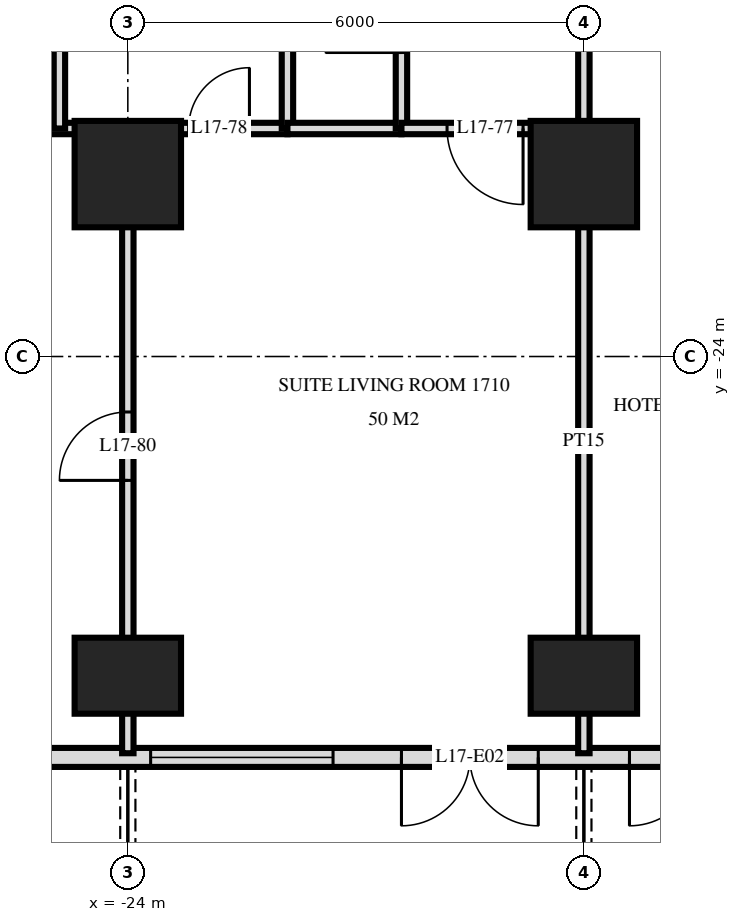
"""IFC4 building model, lengths in metres.
Left out: names, types, materials, properties, quantities, classifications, styles, units other than length and angle.
Written with IfcOpenShell. Run it as: python <this file> out.ifc"""

import sys

from ifc_helpers import new_model, si_unit, direction, frame, frame_2d, origin, origin_2d, place, context, subcontext, project, spatial, rectangle, extrude, element, fill, save


model = new_model("IFC4")
c1 = context("Model", 3, precision=1e-05, world=origin(), true_north=direction((0.0, 1.0)))
c2 = subcontext(c1, "Body", "Model", "MODEL_VIEW")
j1 = project(units=[si_unit("LENGTHUNIT", "METRE"), si_unit("PLANEANGLEUNIT", "RADIAN")], contexts=[c1])
p1 = place(None, origin())
s1 = spatial("IfcSite", under=j1, at=p1, CompositionType="ELEMENT")
p2 = place(p1, origin())
s2 = spatial("IfcBuilding", under=s1, at=p2, CompositionType="ELEMENT")
p3 = place(p2, frame((0.0, 0.0, 70.8)))
s3 = spatial("IfcBuildingStorey", under=s2, at=p3, CompositionType="ELEMENT", Elevation=70.8)
p4 = place(p3, frame((-24.0, -28.2, 0.0), z_axis=(0.0, 0.0, 1.0), x_axis=(1.0, 0.0, 0.0)))
e1 = element("IfcColumn", 1, at=p4, inside=s3, PredefinedType="COLUMN", context=c2, shape_type="SweptSolid", body=[
    extrude(rectangle(XDim=1.4, YDim=1.0, at=origin_2d()), origin(), (0.0, 0.0, 1.0), 3.6),
])
p5 = place(p3, frame((-24.0, -21.6, 0.0), z_axis=(0.0, 0.0, 1.0), x_axis=(1.0, 0.0, 0.0)))
e2 = element("IfcColumn", 2, at=p5, inside=s3, PredefinedType="COLUMN", context=c2, shape_type="SweptSolid", body=[
    extrude(rectangle(XDim=1.4, YDim=1.4, at=origin_2d()), origin(), (0.0, 0.0, 1.0), 3.6),
])
p6 = place(p3, frame((-18.0, -28.2, 0.0), z_axis=(0.0, 0.0, 1.0), x_axis=(1.0, 0.0, 0.0)))
e3 = element("IfcColumn", 3, at=p6, inside=s3, PredefinedType="COLUMN", context=c2, shape_type="SweptSolid", body=[
    extrude(rectangle(XDim=1.4, YDim=1.0, at=origin_2d()), origin(), (0.0, 0.0, 1.0), 3.6),
])
p7 = place(p3, frame((-18.0, -21.6, 0.0), z_axis=(0.0, 0.0, 1.0), x_axis=(1.0, 0.0, 0.0)))
e4 = element("IfcColumn", 4, at=p7, inside=s3, PredefinedType="COLUMN", context=c2, shape_type="SweptSolid", body=[
    extrude(rectangle(XDim=1.4, YDim=1.4, at=origin_2d()), origin(), (0.0, 0.0, 1.0), 3.6),
])
p8 = place(p3, frame((-28.775, -29.275, 0.0), z_axis=(0.0, 0.0, 1.0), x_axis=(1.0, 0.0, 0.0)))
e5 = element("IfcWall", 5, at=p8, inside=s3, PredefinedType="SOLIDWALL", context=c2, shape_type="SweptSolid", body=[
    extrude(rectangle(XDim=57.551, YDim=0.25, at=frame_2d((28.775, 0.0))), origin(), (0.0, 0.0, 1.0), 3.32),
])
p9 = place(p8, frame((0.575, 0.0, 0.0)))
e6 = element("IfcOpeningElement", 6, at=p9, cuts=e5, PredefinedType="OPENING", context=c2, shape_type="SweptSolid", body=[
    extrude(rectangle(XDim=1.8, YDim=2.4, at=frame_2d((0.9, 1.2))), frame((0.0, 0.135, 0.0), z_axis=(0.0, -1.0, 0.0), x_axis=(1.0, 0.0, 0.0)), (0.0, 0.0, 1.0), 0.27),
])
p10 = place(p8, frame((5.075, 0.0, 0.3)))
e7 = element("IfcOpeningElement", 7, at=p10, cuts=e5, PredefinedType="OPENING", context=c2, shape_type="SweptSolid", body=[
    extrude(rectangle(XDim=2.4, YDim=2.1, at=frame_2d((1.2, 1.05))), frame((0.0, 0.135, 0.0), z_axis=(0.0, -1.0, 0.0), x_axis=(1.0, 0.0, 0.0)), (0.0, 0.0, 1.0), 0.27),
])
p11 = place(p8, frame((8.375, 0.0, 0.0)))
e8 = element("IfcOpeningElement", 8, at=p11, cuts=e5, PredefinedType="OPENING", context=c2, shape_type="SweptSolid", body=[
    extrude(rectangle(XDim=1.8, YDim=2.4, at=frame_2d((0.9, 1.2))), frame((0.0, 0.135, 0.0), z_axis=(0.0, -1.0, 0.0), x_axis=(1.0, 0.0, 0.0)), (0.0, 0.0, 1.0), 0.27),
])
p12 = place(p8, frame((11.375, 0.0, 0.0)))
e9 = element("IfcOpeningElement", 9, at=p12, cuts=e5, PredefinedType="OPENING", context=c2, shape_type="SweptSolid", body=[
    extrude(rectangle(XDim=1.8, YDim=2.4, at=frame_2d((0.9, 1.2))), frame((0.0, 0.135, 0.0), z_axis=(0.0, -1.0, 0.0), x_axis=(1.0, 0.0, 0.0)), (0.0, 0.0, 1.0), 0.27),
])
p13 = place(p8, frame((14.075, 0.0, 0.3)))
e10 = element("IfcOpeningElement", 10, at=p13, cuts=e5, PredefinedType="OPENING", context=c2, shape_type="SweptSolid", body=[
    extrude(rectangle(XDim=2.4, YDim=2.1, at=frame_2d((1.2, 1.05))), frame((0.0, 0.135, 0.0), z_axis=(0.0, -1.0, 0.0), x_axis=(1.0, 0.0, 0.0)), (0.0, 0.0, 1.0), 0.27),
])
p14 = place(p8, frame((17.375, 0.0, 0.0)))
e11 = element("IfcOpeningElement", 11, at=p14, cuts=e5, PredefinedType="OPENING", context=c2, shape_type="SweptSolid", body=[
    extrude(rectangle(XDim=1.8, YDim=2.4, at=frame_2d((0.9, 1.2))), frame((0.0, 0.135, 0.0), z_axis=(0.0, -1.0, 0.0), x_axis=(1.0, 0.0, 0.0)), (0.0, 0.0, 1.0), 0.27),
])
p15 = place(p8, frame((20.075, 0.0, 0.3)))
e12 = element("IfcOpeningElement", 12, at=p15, cuts=e5, PredefinedType="OPENING", context=c2, shape_type="SweptSolid", body=[
    extrude(rectangle(XDim=2.4, YDim=2.1, at=frame_2d((1.2, 1.05))), frame((0.0, 0.135, 0.0), z_axis=(0.0, -1.0, 0.0), x_axis=(1.0, 0.0, 0.0)), (0.0, 0.0, 1.0), 0.27),
])
p16 = place(p8, frame((23.075, 0.0, 0.3)))
e13 = element("IfcOpeningElement", 13, at=p16, cuts=e5, PredefinedType="OPENING", context=c2, shape_type="SweptSolid", body=[
    extrude(rectangle(XDim=2.4, YDim=2.1, at=frame_2d((1.2, 1.05))), frame((0.0, 0.135, 0.0), z_axis=(0.0, -1.0, 0.0), x_axis=(1.0, 0.0, 0.0)), (0.0, 0.0, 1.0), 0.27),
])
p17 = place(p8, frame((26.375, 0.0, 0.0)))
e14 = element("IfcOpeningElement", 14, at=p17, cuts=e5, PredefinedType="OPENING", context=c2, shape_type="SweptSolid", body=[
    extrude(rectangle(XDim=1.8, YDim=2.4, at=frame_2d((0.9, 1.2))), frame((0.0, 0.135, 0.0), z_axis=(0.0, -1.0, 0.0), x_axis=(1.0, 0.0, 0.0)), (0.0, 0.0, 1.0), 0.27),
])
p18 = place(p8, frame((29.375, 0.0, 0.0)))
e15 = element("IfcOpeningElement", 15, at=p18, cuts=e5, PredefinedType="OPENING", context=c2, shape_type="SweptSolid", body=[
    extrude(rectangle(XDim=1.8, YDim=2.4, at=frame_2d((0.9, 1.2))), frame((0.0, 0.135, 0.0), z_axis=(0.0, -1.0, 0.0), x_axis=(1.0, 0.0, 0.0)), (0.0, 0.0, 1.0), 0.27),
])
p19 = place(p8, frame((32.075, 0.0, 0.3)))
e16 = element("IfcOpeningElement", 16, at=p19, cuts=e5, PredefinedType="OPENING", context=c2, shape_type="SweptSolid", body=[
    extrude(rectangle(XDim=2.4, YDim=2.1, at=frame_2d((1.2, 1.05))), frame((0.0, 0.135, 0.0), z_axis=(0.0, -1.0, 0.0), x_axis=(1.0, 0.0, 0.0)), (0.0, 0.0, 1.0), 0.27),
])
p20 = place(p8, frame((35.375, 0.0, 0.0)))
e17 = element("IfcOpeningElement", 17, at=p20, cuts=e5, PredefinedType="OPENING", context=c2, shape_type="SweptSolid", body=[
    extrude(rectangle(XDim=1.8, YDim=2.4, at=frame_2d((0.9, 1.2))), frame((0.0, 0.135, 0.0), z_axis=(0.0, -1.0, 0.0), x_axis=(1.0, 0.0, 0.0)), (0.0, 0.0, 1.0), 0.27),
])
p21 = place(p8, frame((38.075, 0.0, 0.3)))
e18 = element("IfcOpeningElement", 18, at=p21, cuts=e5, PredefinedType="OPENING", context=c2, shape_type="SweptSolid", body=[
    extrude(rectangle(XDim=2.4, YDim=2.1, at=frame_2d((1.2, 1.05))), frame((0.0, 0.135, 0.0), z_axis=(0.0, -1.0, 0.0), x_axis=(1.0, 0.0, 0.0)), (0.0, 0.0, 1.0), 0.27),
])
p22 = place(p8, frame((41.075, 0.0, 0.3)))
e19 = element("IfcOpeningElement", 19, at=p22, cuts=e5, PredefinedType="OPENING", context=c2, shape_type="SweptSolid", body=[
    extrude(rectangle(XDim=2.4, YDim=2.1, at=frame_2d((1.2, 1.05))), frame((0.0, 0.135, 0.0), z_axis=(0.0, -1.0, 0.0), x_axis=(1.0, 0.0, 0.0)), (0.0, 0.0, 1.0), 0.27),
])
p23 = place(p8, frame((44.375, 0.0, 0.0)))
e20 = element("IfcOpeningElement", 20, at=p23, cuts=e5, PredefinedType="OPENING", context=c2, shape_type="SweptSolid", body=[
    extrude(rectangle(XDim=1.8, YDim=2.4, at=frame_2d((0.9, 1.2))), frame((0.0, 0.135, 0.0), z_axis=(0.0, -1.0, 0.0), x_axis=(1.0, 0.0, 0.0)), (0.0, 0.0, 1.0), 0.27),
])
p24 = place(p8, frame((47.075, 0.0, 0.3)))
e21 = element("IfcOpeningElement", 21, at=p24, cuts=e5, PredefinedType="OPENING", context=c2, shape_type="SweptSolid", body=[
    extrude(rectangle(XDim=2.4, YDim=2.1, at=frame_2d((1.2, 1.05))), frame((0.0, 0.135, 0.0), z_axis=(0.0, -1.0, 0.0), x_axis=(1.0, 0.0, 0.0)), (0.0, 0.0, 1.0), 0.27),
])
p25 = place(p8, frame((50.375, 0.0, 0.0)))
e22 = element("IfcOpeningElement", 22, at=p25, cuts=e5, PredefinedType="OPENING", context=c2, shape_type="SweptSolid", body=[
    extrude(rectangle(XDim=1.8, YDim=2.4, at=frame_2d((0.9, 1.2))), frame((0.0, 0.135, 0.0), z_axis=(0.0, -1.0, 0.0), x_axis=(1.0, 0.0, 0.0)), (0.0, 0.0, 1.0), 0.27),
])
p26 = place(p8, frame((53.375, 0.0, 0.0)))
e23 = element("IfcOpeningElement", 23, at=p26, cuts=e5, PredefinedType="OPENING", context=c2, shape_type="SweptSolid", body=[
    extrude(rectangle(XDim=1.8, YDim=2.4, at=frame_2d((0.9, 1.2))), frame((0.0, 0.135, 0.0), z_axis=(0.0, -1.0, 0.0), x_axis=(1.0, 0.0, 0.0)), (0.0, 0.0, 1.0), 0.27),
])
p27 = place(p3, frame((-18.0, -21.0, 0.0), z_axis=(0.0, 0.0, 1.0), x_axis=(0.0, 1.0, 0.0)))
e24 = element("IfcWall", 24, at=p27, inside=s3, PredefinedType="PARTITIONING", context=c2, shape_type="SweptSolid", body=[
    extrude(rectangle(XDim=3.0, YDim=0.15, at=frame_2d((1.5, 0.0))), origin(), (0.0, 0.0, 1.0), 3.32),
])
p28 = place(p3, frame((-18.0, -29.22, 0.0), z_axis=(0.0, 0.0, 1.0), x_axis=(0.0, 1.0, 0.0)))
e25 = element("IfcWall", 25, at=p28, inside=s3, PredefinedType="PARTITIONING", context=c2, shape_type="SweptSolid", body=[
    extrude(rectangle(XDim=8.22, YDim=0.15, at=frame_2d((4.11, 0.0))), origin(), (0.0, 0.0, 1.0), 3.32),
])
p29 = place(p3, frame((-20.4, -21.0, 0.0), z_axis=(0.0, 0.0, 1.0), x_axis=(0.0, 1.0, 0.0)))
e26 = element("IfcWall", 26, at=p29, inside=s3, PredefinedType="PARTITIONING", context=c2, shape_type="SweptSolid", body=[
    extrude(rectangle(XDim=3.0, YDim=0.15, at=frame_2d((1.5, 0.0))), origin(), (0.0, 0.0, 1.0), 3.32),
])
p30 = place(p29, frame((1.0, 0.0, 0.0)))
e27 = element("IfcOpeningElement", 27, at=p30, cuts=e26, PredefinedType="OPENING", context=c2, shape_type="SweptSolid", body=[
    extrude(rectangle(XDim=1.0, YDim=2.1, at=frame_2d((0.5, 1.05))), frame((0.0, 0.085, 0.0), z_axis=(0.0, -1.0, 0.0), x_axis=(1.0, 0.0, 0.0)), (0.0, 0.0, 1.0), 0.17),
])
p31 = place(p3, frame((-21.9, -21.0, 0.0), z_axis=(0.0, 0.0, 1.0), x_axis=(0.0, 1.0, 0.0)))
e28 = element("IfcWall", 28, at=p31, inside=s3, PredefinedType="PLUMBINGWALL", context=c2, shape_type="SweptSolid", body=[
    extrude(rectangle(XDim=3.0, YDim=0.15, at=frame_2d((1.5, 0.0))), origin(), (0.0, 0.0, 1.0), 3.32),
])
p32 = place(p3, frame((-24.0, -29.22, 0.0), z_axis=(0.0, 0.0, 1.0), x_axis=(0.0, 1.0, 0.0)))
e29 = element("IfcWall", 29, at=p32, inside=s3, PredefinedType="PARTITIONING", context=c2, shape_type="SweptSolid", body=[
    extrude(rectangle(XDim=8.22, YDim=0.15, at=frame_2d((4.11, 0.0))), origin(), (0.0, 0.0, 1.0), 3.32),
])
p33 = place(p32, frame((3.59, 0.0, 0.0)))
e30 = element("IfcOpeningElement", 30, at=p33, cuts=e29, PredefinedType="OPENING", context=c2, shape_type="SweptSolid", body=[
    extrude(rectangle(XDim=0.9, YDim=2.1, at=frame_2d((0.45, 1.05))), frame((0.0, 0.085, 0.0), z_axis=(0.0, -1.0, 0.0), x_axis=(1.0, 0.0, 0.0)), (0.0, 0.0, 1.0), 0.17),
])
p34 = place(p3, frame((-24.9, -21.0, 0.0), z_axis=(0.0, 0.0, 1.0), x_axis=(0.0, 1.0, 0.0)))
e31 = element("IfcWall", 31, at=p34, inside=s3, PredefinedType="PARTITIONING", context=c2, shape_type="SweptSolid", body=[
    extrude(rectangle(XDim=3.0, YDim=0.15, at=frame_2d((1.5, 0.0))), origin(), (0.0, 0.0, 1.0), 3.32),
])
p35 = place(p3, frame((-20.4, -21.0, 0.0), z_axis=(0.0, 0.0, 1.0), x_axis=(1.0, 0.0, 0.0)))
e32 = element("IfcWall", 32, at=p35, inside=s3, PredefinedType="PARTITIONING", context=c2, shape_type="SweptSolid", body=[
    extrude(rectangle(XDim=2.4, YDim=0.15, at=frame_2d((1.2, 0.0))), origin(), (0.0, 0.0, 1.0), 3.32),
])
p36 = place(p35, frame((0.6, 0.0, 0.0)))
e33 = element("IfcOpeningElement", 33, at=p36, cuts=e32, PredefinedType="OPENING", context=c2, shape_type="SweptSolid", body=[
    extrude(rectangle(XDim=1.0, YDim=2.1, at=frame_2d((0.5, 1.05))), frame((0.0, 0.085, 0.0), z_axis=(0.0, -1.0, 0.0), x_axis=(1.0, 0.0, 0.0)), (0.0, 0.0, 1.0), 0.17),
])
p37 = place(p3, frame((-33.12, -21.0, 0.0), z_axis=(0.0, 0.0, 1.0), x_axis=(1.0, 0.0, 0.0)))
e34 = element("IfcWall", 34, at=p37, inside=s3, PredefinedType="PARTITIONING", context=c2, shape_type="SweptSolid", body=[
    extrude(rectangle(XDim=11.22, YDim=0.15, at=frame_2d((5.61, 0.0))), origin(), (0.0, 0.0, 1.0), 3.32),
])
p38 = place(p37, frame((9.92, 0.0, 0.0)))
e35 = element("IfcOpeningElement", 35, at=p38, cuts=e34, PredefinedType="OPENING", context=c2, shape_type="SweptSolid", body=[
    extrude(rectangle(XDim=0.8, YDim=2.1, at=frame_2d((0.4, 1.05))), frame((0.0, 0.085, 0.0), z_axis=(0.0, -1.0, 0.0), x_axis=(1.0, 0.0, 0.0)), (0.0, 0.0, 1.0), 0.17),
])
p39 = place(p37, frame((3.92, 0.0, 0.0)))
e36 = element("IfcOpeningElement", 36, at=p39, cuts=e34, PredefinedType="OPENING", context=c2, shape_type="SweptSolid", body=[
    extrude(rectangle(XDim=0.9, YDim=2.1, at=frame_2d((0.45, 1.05))), frame((0.0, 0.085, 0.0), z_axis=(0.0, -1.0, 0.0), x_axis=(1.0, 0.0, 0.0)), (0.0, 0.0, 1.0), 0.17),
])
p40 = place(p3, frame((-21.9, -21.0, 0.0), z_axis=(0.0, 0.0, 1.0), x_axis=(1.0, 0.0, 0.0)))
e37 = element("IfcWall", 37, at=p40, inside=s3, PredefinedType="PLUMBINGWALL", context=c2, shape_type="SweptSolid", body=[
    extrude(rectangle(XDim=1.5, YDim=0.15, at=frame_2d((0.75, 0.0))), origin(), (0.0, 0.0, 1.0), 3.32),
])
p41 = place(p10, origin())
e38 = element("IfcWindow", 38, at=p41, inside=s3, PartitioningType="SINGLE_PANEL", PredefinedType="WINDOW", context=c2, shape_type="SweptSolid", body=[
    extrude(rectangle(XDim=2.4, YDim=2.1, at=frame_2d((1.2, 1.05))), frame((0.0, 0.03, 0.0), z_axis=(0.0, -1.0, 0.0), x_axis=(1.0, 0.0, 0.0)), (0.0, 0.0, 1.0), 0.06),
])
fill(e7, e38)
p42 = place(p11, frame((0.9, 0.0, 0.0), z_axis=(0.0, 0.0, 1.0), x_axis=(-1.0, 0.0, 0.0)))
e39 = element("IfcDoor", 39, at=p42, inside=s3, OperationType="DOUBLE_DOOR_SINGLE_SWING", PredefinedType="DOOR", context=c2, shape_type="SweptSolid", body=[
    extrude(rectangle(XDim=1.8, YDim=2.4, at=frame_2d((0.0, 1.2))), frame((0.0, -0.025, 0.0), z_axis=(0.0, 1.0, 0.0), x_axis=(-1.0, 0.0, 0.0)), (0.0, 0.0, 1.0), 0.05),
])
fill(e8, e39)
p43 = place(p12, frame((0.9, 0.0, 0.0), z_axis=(0.0, 0.0, 1.0), x_axis=(-1.0, 0.0, 0.0)))
e40 = element("IfcDoor", 40, at=p43, inside=s3, OperationType="DOUBLE_DOOR_SINGLE_SWING", PredefinedType="DOOR", context=c2, shape_type="SweptSolid", body=[
    extrude(rectangle(XDim=1.8, YDim=2.4, at=frame_2d((0.0, 1.2))), frame((0.0, -0.025, 0.0), z_axis=(0.0, 1.0, 0.0), x_axis=(-1.0, 0.0, 0.0)), (0.0, 0.0, 1.0), 0.05),
])
fill(e9, e40)
p44 = place(p36, frame((0.5, 0.0, 0.0), z_axis=(0.0, 0.0, 1.0), x_axis=(-1.0, 0.0, 0.0)))
e41 = element("IfcDoor", 41, at=p44, inside=s3, OperationType="SINGLE_SWING_RIGHT", PredefinedType="DOOR", context=c2, shape_type="SweptSolid", body=[
    extrude(rectangle(XDim=1.0, YDim=2.1, at=frame_2d((0.0, 1.05))), frame((0.0, -0.025, 0.0), z_axis=(0.0, 1.0, 0.0), x_axis=(-1.0, 0.0, 0.0)), (0.0, 0.0, 1.0), 0.05),
])
fill(e33, e41)
p45 = place(p38, origin())
e42 = element("IfcDoor", 42, at=p45, inside=s3, OperationType="SINGLE_SWING_LEFT", PredefinedType="DOOR", context=c2, shape_type="SweptSolid", body=[
    extrude(rectangle(XDim=0.8, YDim=2.1, at=frame_2d((0.4, 1.05))), frame((0.0, 0.025, 0.0), z_axis=(0.0, -1.0, 0.0), x_axis=(1.0, 0.0, 0.0)), (0.0, 0.0, 1.0), 0.05),
])
fill(e35, e42)
p46 = place(p33, origin())
e43 = element("IfcDoor", 43, at=p46, inside=s3, OperationType="SINGLE_SWING_RIGHT", PredefinedType="DOOR", context=c2, shape_type="SweptSolid", body=[
    extrude(rectangle(XDim=0.9, YDim=2.1, at=frame_2d((0.45, 1.05))), frame((0.0, 0.025, 0.0), z_axis=(0.0, -1.0, 0.0), x_axis=(1.0, 0.0, 0.0)), (0.0, 0.0, 1.0), 0.05),
])
fill(e30, e43)
save(model, sys.argv[1])
